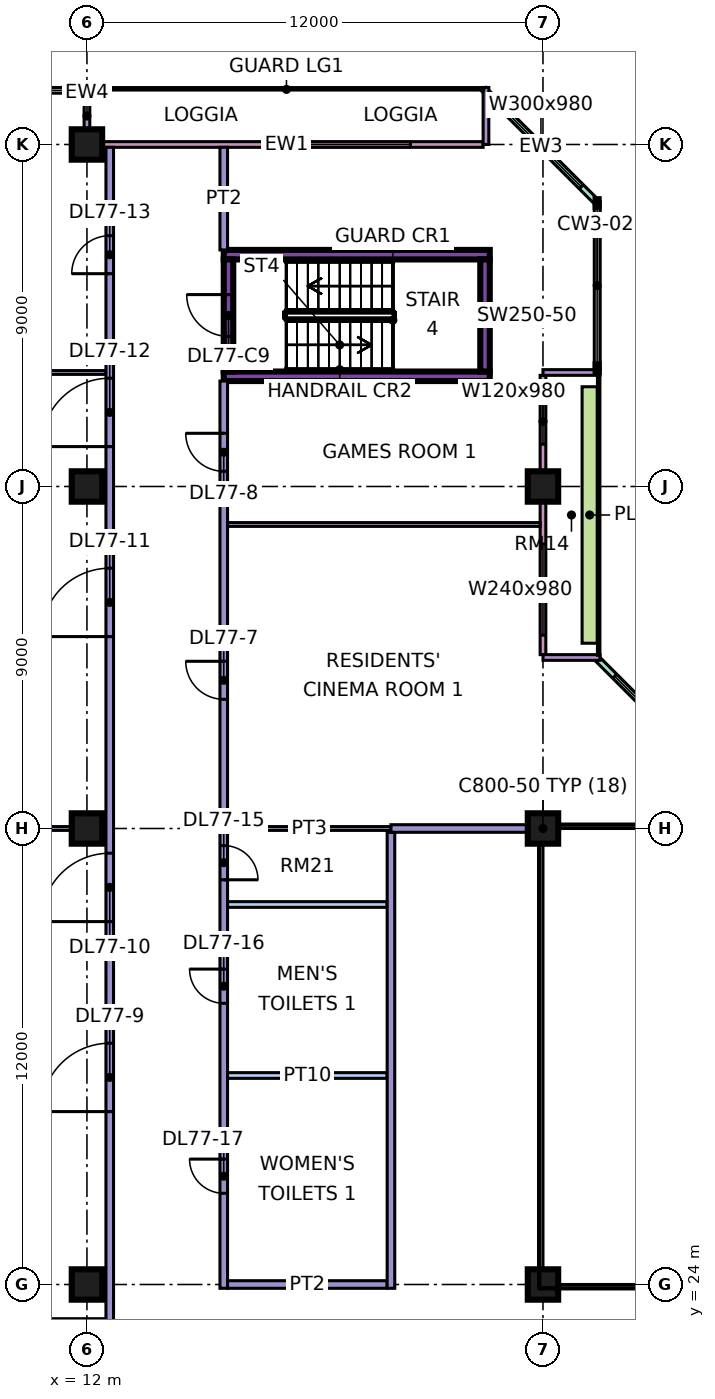
"""IFC4 building model, lengths in metres.
Left out: names, types, materials, properties, quantities, classifications, styles, units other than length and angle.
Written with IfcOpenShell. Run it as: python <this file> out.ifc"""

import sys

from ifc_helpers import new_model, si_unit, direction, frame, frame_2d, origin, origin_2d, place, context, subcontext, project, spatial, rectangle, extrude, element, fill, save


model = new_model("IFC4")
c1 = context("Model", 3, precision=1e-05, world=origin(), true_north=direction((0.0, 1.0)))
c2 = subcontext(c1, "Body", "Model", "MODEL_VIEW")
j1 = project(units=[si_unit("LENGTHUNIT", "METRE"), si_unit("PLANEANGLEUNIT", "RADIAN")], contexts=[c1])
p1 = place(None, origin())
s1 = spatial("IfcSite", under=j1, at=p1, CompositionType="ELEMENT")
p2 = place(p1, origin())
s2 = spatial("IfcBuilding", under=s1, at=p2, CompositionType="ELEMENT")
p3 = place(p2, frame((0.0, 0.0, 327.65)))
s3 = spatial("IfcBuildingStorey", under=s2, at=p3, CompositionType="ELEMENT", Elevation=327.65)
for number, where, z_axis, x_axis in (
    (1, (12.0, 24.0, 0.0), (0.0, 0.0, 1.0), (1.0, 0.0, 0.0)),
    (2, (12.0, 36.0, 0.0), (0.0, 0.0, 1.0), (1.0, 0.0, 0.0)),
    (3, (12.0, 45.0, 0.0), (0.0, 0.0, 1.0), (1.0, 0.0, 0.0)),
    (4, (12.0, 54.0, 0.0), (0.0, 0.0, 1.0), (1.0, 0.0, 0.0)),
    (5, (24.0, 24.0, 0.0), (0.0, 0.0, 1.0), (1.0, 0.0, 0.0)),
    (6, (24.0, 36.0, 0.0), (0.0, 0.0, 1.0), (1.0, 0.0, 0.0)),
    (7, (24.0, 45.0, 0.0), (0.0, 0.0, 1.0), (1.0, 0.0, 0.0)),
):
    element("IfcColumn", number, at=place(p3, frame(where, z_axis=z_axis, x_axis=x_axis)), inside=s3, PredefinedType="COLUMN", context=c2, shape_type="SweptSolid", body=[
        extrude(rectangle(XDim=0.8, YDim=0.8, at=origin_2d()), origin(), (0.0, 0.0, 1.0), 11.25),
    ])
for number, where, z_axis, x_axis in (
    (8, (15.6, 47.9, 0.0), (0.0, 0.0, 1.0), (1.0, 0.0, 0.0)),
    (9, (15.6, 51.1, 0.0), (0.0, 0.0, 1.0), (1.0, 0.0, 0.0)),
):
    element("IfcWall", number, at=place(p3, frame(where, z_axis=z_axis, x_axis=x_axis)), inside=s3, PredefinedType="SHEAR", context=c2, shape_type="SweptSolid", body=[
        extrude(rectangle(XDim=7.0, YDim=0.25, at=frame_2d((3.5, 0.0))), origin(), (0.0, 0.0, 1.0), 11.25),
    ])
p4 = place(p3, frame((15.725, 48.025, 0.0), z_axis=(0.0, 0.0, 1.0), x_axis=(0.0, 1.0, 0.0)))
e10 = element("IfcWall", 10, at=p4, inside=s3, PredefinedType="SHEAR", context=c2, shape_type="SweptSolid", body=[
    extrude(rectangle(XDim=2.95, YDim=0.25, at=frame_2d((1.475, 0.0))), origin(), (0.0, 0.0, 1.0), 11.25),
])
p5 = place(p4, frame((0.925, 0.0, 0.0)))
e11 = element("IfcOpeningElement", 11, at=p5, cuts=e10, PredefinedType="OPENING", context=c2, shape_type="SweptSolid", body=[
    extrude(rectangle(XDim=1.1, YDim=2.2, at=frame_2d((0.55, 1.1))), frame((0.0, 0.135, 0.0), z_axis=(0.0, -1.0, 0.0), x_axis=(1.0, 0.0, 0.0)), (0.0, 0.0, 1.0), 0.27),
])
p6 = place(p3, frame((22.475, 48.025, 0.0), z_axis=(0.0, 0.0, 1.0), x_axis=(0.0, 1.0, 0.0)))
e12 = element("IfcWall", 12, at=p6, inside=s3, PredefinedType="SHEAR", context=c2, shape_type="SweptSolid", body=[
    extrude(rectangle(XDim=2.95, YDim=0.25, at=frame_2d((1.475, 0.0))), origin(), (0.0, 0.0, 1.0), 11.25),
])
p7 = place(p3, frame((28.447, 37.447, 0.0), z_axis=(0.0, 0.0, 1.0), x_axis=(-0.707106781187, 0.707106781187, 0.0)))
e13 = element("IfcWall", 13, at=p7, inside=s3, PredefinedType="SOLIDWALL", context=c2, shape_type="SweptSolid", body=[
    extrude(rectangle(XDim=4.243, YDim=0.15, at=frame_2d((2.121, 0.0))), origin(), (0.0, 0.0, 1.0), 10.85),
])
p8 = place(p7, frame((0.621, 0.0, 0.45)))
e14 = element("IfcOpeningElement", 14, at=p8, cuts=e13, PredefinedType="OPENING", context=c2, shape_type="SweptSolid", body=[
    extrude(rectangle(XDim=3.0, YDim=9.8, at=frame_2d((1.5, 4.9))), frame((0.0, 0.085, 0.0), z_axis=(0.0, -1.0, 0.0), x_axis=(1.0, 0.0, 0.0)), (0.0, 0.0, 1.0), 0.17),
])
p9 = place(p3, frame((24.0, 40.575, 0.0), z_axis=(0.0, 0.0, 1.0), x_axis=(0.0, 1.0, 0.0)))
e15 = element("IfcWall", 15, at=p9, inside=s3, PredefinedType="SOLIDWALL", context=c2, shape_type="SweptSolid", body=[
    extrude(rectangle(XDim=7.35, YDim=0.15, at=frame_2d((3.675, 0.0))), origin(), (0.0, 0.0, 1.0), 10.85),
])
p10 = place(p9, frame((0.512, 0.0, 0.45)))
e16 = element("IfcOpeningElement", 16, at=p10, cuts=e15, PredefinedType="OPENING", context=c2, shape_type="SweptSolid", body=[
    extrude(rectangle(XDim=2.4, YDim=9.8, at=frame_2d((1.2, 4.9))), frame((0.0, 0.085, 0.0), z_axis=(0.0, -1.0, 0.0), x_axis=(1.0, 0.0, 0.0)), (0.0, 0.0, 1.0), 0.17),
])
p11 = place(p9, frame((5.538, 0.0, 0.45)))
e17 = element("IfcOpeningElement", 17, at=p11, cuts=e15, PredefinedType="OPENING", context=c2, shape_type="SweptSolid", body=[
    extrude(rectangle(XDim=1.2, YDim=9.8, at=frame_2d((0.6, 4.9))), frame((0.0, 0.085, 0.0), z_axis=(0.0, -1.0, 0.0), x_axis=(1.0, 0.0, 0.0)), (0.0, 0.0, 1.0), 0.17),
])
for number, where, z_axis, x_axis in (
    (18, (25.5, 40.5, 0.0), (0.0, 0.0, 1.0), (-1.0, 0.0, 0.0)),
    (19, (25.5, 48.0, 0.0), (0.0, 0.0, 1.0), (-1.0, 0.0, 0.0)),
):
    element("IfcWall", number, at=place(p3, frame(where, z_axis=z_axis, x_axis=x_axis)), inside=s3, PredefinedType="SOLIDWALL", context=c2, shape_type="SweptSolid", body=[
        extrude(rectangle(XDim=1.5, YDim=0.15, at=frame_2d((0.75, 0.0))), origin(), (0.0, 0.0, 1.0), 10.85),
    ])
p12 = place(p3, frame((25.447, 52.447, 0.0), z_axis=(0.0, 0.0, 1.0), x_axis=(-0.707106781187, 0.707106781187, 0.0)))
e20 = element("IfcWall", 20, at=p12, inside=s3, PredefinedType="SOLIDWALL", context=c2, shape_type="SweptSolid", body=[
    extrude(rectangle(XDim=4.243, YDim=0.15, at=frame_2d((2.121, 0.0))), origin(), (0.0, 0.0, 1.0), 10.85),
])
p13 = place(p12, frame((0.621, 0.0, 0.45)))
e21 = element("IfcOpeningElement", 21, at=p13, cuts=e20, PredefinedType="OPENING", context=c2, shape_type="SweptSolid", body=[
    extrude(rectangle(XDim=3.0, YDim=9.8, at=frame_2d((1.5, 4.9))), frame((0.0, 0.085, 0.0), z_axis=(0.0, -1.0, 0.0), x_axis=(1.0, 0.0, 0.0)), (0.0, 0.0, 1.0), 0.17),
])
p14 = place(p3, frame((22.425, 54.0, 0.0), z_axis=(0.0, 0.0, 1.0), x_axis=(-1.0, 0.0, 0.0)))
e22 = element("IfcWall", 22, at=p14, inside=s3, PredefinedType="SOLIDWALL", context=c2, shape_type="SweptSolid", body=[
    extrude(rectangle(XDim=10.35, YDim=0.15, at=frame_2d((5.175, 0.0))), origin(), (0.0, 0.0, 1.0), 10.85),
])
p15 = place(p14, frame((1.913, 0.0, 0.45)))
e23 = element("IfcOpeningElement", 23, at=p15, cuts=e22, PredefinedType="OPENING", context=c2, shape_type="SweptSolid", body=[
    extrude(rectangle(XDim=3.0, YDim=9.8, at=frame_2d((1.5, 4.9))), frame((0.0, 0.085, 0.0), z_axis=(0.0, -1.0, 0.0), x_axis=(1.0, 0.0, 0.0)), (0.0, 0.0, 1.0), 0.17),
])
for number, where, z_axis, x_axis in (
    (24, (22.5, 55.5, 0.0), (0.0, 0.0, 1.0), (0.0, -1.0, 0.0)),
    (25, (12.0, 55.5, 0.0), (0.0, 0.0, 1.0), (0.0, -1.0, 0.0)),
):
    element("IfcWall", number, at=place(p3, frame(where, z_axis=z_axis, x_axis=x_axis)), inside=s3, PredefinedType="SOLIDWALL", context=c2, shape_type="SweptSolid", body=[
        extrude(rectangle(XDim=1.5, YDim=0.15, at=frame_2d((0.75, 0.0))), origin(), (0.0, 0.0, 1.0), 10.85),
    ])
p16 = place(p3, frame((25.229, 40.875, 0.0), z_axis=(0.0, 0.0, 1.0), x_axis=(0.0, 1.0, 0.0)))
e26 = element("IfcWall", 26, at=p16, inside=s3, PredefinedType="SOLIDWALL", context=c2, shape_type="SweptSolid", body=[
    extrude(rectangle(XDim=6.75, YDim=0.4, at=frame_2d((3.375, 0.0))), origin(), (0.0, 0.0, 1.0), 0.7),
])
p17 = place(p3, frame((0.0, 36.0, 0.0), z_axis=(0.0, 0.0, 1.0), x_axis=(1.0, 0.0, 0.0)))
e27 = element("IfcWall", 27, at=p17, inside=s3, PredefinedType="PARTITIONING", context=c2, shape_type="SweptSolid", body=[
    extrude(rectangle(XDim=12.5, YDim=0.1, at=frame_2d((6.25, 0.0))), origin(), (0.0, 0.0, 1.0), 10.85),
])
p18 = place(p3, frame((0.0, 48.0, 0.0), z_axis=(0.0, 0.0, 1.0), x_axis=(1.0, 0.0, 0.0)))
e28 = element("IfcWall", 28, at=p18, inside=s3, PredefinedType="PARTITIONING", context=c2, shape_type="SweptSolid", body=[
    extrude(rectangle(XDim=12.5, YDim=0.1, at=frame_2d((6.25, 0.0))), origin(), (0.0, 0.0, 1.0), 10.85),
])
p19 = place(p3, frame((0.074, 23.0, 0.0), z_axis=(0.0, 0.0, 1.0), x_axis=(1.0, 0.0, 0.0)))
e29 = element("IfcWall", 29, at=p19, inside=s3, PredefinedType="PARTITIONING", context=c2, shape_type="SweptSolid", body=[
    extrude(rectangle(XDim=12.426, YDim=0.2, at=frame_2d((6.213, 0.0))), origin(), (0.0, 0.0, 1.0), 10.85),
])
p20 = place(p3, frame((12.6, 22.9, 0.0), z_axis=(0.0, 0.0, 1.0), x_axis=(0.0, 1.0, 0.0)))
e30 = element("IfcWall", 30, at=p20, inside=s3, PredefinedType="PARTITIONING", context=c2, shape_type="SweptSolid", body=[
    extrude(rectangle(XDim=31.026, YDim=0.2, at=frame_2d((15.513, 0.0))), origin(), (0.0, 0.0, 1.0), 10.85),
])
p21 = place(p20, frame((5.65, 0.0, 0.0)))
e31 = element("IfcOpeningElement", 31, at=p21, cuts=e30, PredefinedType="OPENING", context=c2, shape_type="SweptSolid", body=[
    extrude(rectangle(XDim=1.8, YDim=2.1, at=frame_2d((0.9, 1.05))), frame((0.0, 0.11, 0.0), z_axis=(0.0, -1.0, 0.0), x_axis=(1.0, 0.0, 0.0)), (0.0, 0.0, 1.0), 0.22),
])
p22 = place(p20, frame((10.65, 0.0, 0.0)))
e32 = element("IfcOpeningElement", 32, at=p22, cuts=e30, PredefinedType="OPENING", context=c2, shape_type="SweptSolid", body=[
    extrude(rectangle(XDim=1.8, YDim=2.1, at=frame_2d((0.9, 1.05))), frame((0.0, 0.11, 0.0), z_axis=(0.0, -1.0, 0.0), x_axis=(1.0, 0.0, 0.0)), (0.0, 0.0, 1.0), 0.22),
])
p23 = place(p20, frame((18.15, 0.0, 0.0)))
e33 = element("IfcOpeningElement", 33, at=p23, cuts=e30, PredefinedType="OPENING", context=c2, shape_type="SweptSolid", body=[
    extrude(rectangle(XDim=1.8, YDim=2.1, at=frame_2d((0.9, 1.05))), frame((0.0, 0.11, 0.0), z_axis=(0.0, -1.0, 0.0), x_axis=(1.0, 0.0, 0.0)), (0.0, 0.0, 1.0), 0.22),
])
p24 = place(p20, frame((23.15, 0.0, 0.0)))
e34 = element("IfcOpeningElement", 34, at=p24, cuts=e30, PredefinedType="OPENING", context=c2, shape_type="SweptSolid", body=[
    extrude(rectangle(XDim=1.8, YDim=2.1, at=frame_2d((0.9, 1.05))), frame((0.0, 0.11, 0.0), z_axis=(0.0, -1.0, 0.0), x_axis=(1.0, 0.0, 0.0)), (0.0, 0.0, 1.0), 0.22),
])
p25 = place(p20, frame((27.7, 0.0, 0.0)))
e35 = element("IfcOpeningElement", 35, at=p25, cuts=e30, PredefinedType="OPENING", context=c2, shape_type="SweptSolid", body=[
    extrude(rectangle(XDim=1.0, YDim=2.1, at=frame_2d((0.5, 1.05))), frame((0.0, 0.11, 0.0), z_axis=(0.0, -1.0, 0.0), x_axis=(1.0, 0.0, 0.0)), (0.0, 0.0, 1.0), 0.22),
])
p26 = place(p3, frame((15.6, 23.9, 0.0), z_axis=(0.0, 0.0, 1.0), x_axis=(0.0, 1.0, 0.0)))
e36 = element("IfcWall", 36, at=p26, inside=s3, PredefinedType="PARTITIONING", context=c2, shape_type="SweptSolid", body=[
    extrude(rectangle(XDim=23.875, YDim=0.2, at=frame_2d((11.938, 0.0))), origin(), (0.0, 0.0, 1.0), 10.85),
])
p27 = place(p26, frame((15.5, 0.0, 0.0)))
e37 = element("IfcOpeningElement", 37, at=p27, cuts=e36, PredefinedType="OPENING", context=c2, shape_type="SweptSolid", body=[
    extrude(rectangle(XDim=1.0, YDim=2.1, at=frame_2d((0.5, 1.05))), frame((0.0, 0.11, 0.0), z_axis=(0.0, -1.0, 0.0), x_axis=(1.0, 0.0, 0.0)), (0.0, 0.0, 1.0), 0.22),
])
p28 = place(p26, frame((21.5, 0.0, 0.0)))
e38 = element("IfcOpeningElement", 38, at=p28, cuts=e36, PredefinedType="OPENING", context=c2, shape_type="SweptSolid", body=[
    extrude(rectangle(XDim=1.0, YDim=2.1, at=frame_2d((0.5, 1.05))), frame((0.0, 0.11, 0.0), z_axis=(0.0, -1.0, 0.0), x_axis=(1.0, 0.0, 0.0)), (0.0, 0.0, 1.0), 0.22),
])
p29 = place(p26, frame((10.75, 0.0, 0.0)))
e39 = element("IfcOpeningElement", 39, at=p29, cuts=e36, PredefinedType="OPENING", context=c2, shape_type="SweptSolid", body=[
    extrude(rectangle(XDim=0.9, YDim=2.1, at=frame_2d((0.45, 1.05))), frame((0.0, 0.11, 0.0), z_axis=(0.0, -1.0, 0.0), x_axis=(1.0, 0.0, 0.0)), (0.0, 0.0, 1.0), 0.22),
])
p30 = place(p26, frame((7.5, 0.0, 0.0)))
e40 = element("IfcOpeningElement", 40, at=p30, cuts=e36, PredefinedType="OPENING", context=c2, shape_type="SweptSolid", body=[
    extrude(rectangle(XDim=0.9, YDim=2.1, at=frame_2d((0.45, 1.05))), frame((0.0, 0.11, 0.0), z_axis=(0.0, -1.0, 0.0), x_axis=(1.0, 0.0, 0.0)), (0.0, 0.0, 1.0), 0.22),
])
p31 = place(p26, frame((2.5, 0.0, 0.0)))
e41 = element("IfcOpeningElement", 41, at=p31, cuts=e36, PredefinedType="OPENING", context=c2, shape_type="SweptSolid", body=[
    extrude(rectangle(XDim=0.9, YDim=2.1, at=frame_2d((0.45, 1.05))), frame((0.0, 0.11, 0.0), z_axis=(0.0, -1.0, 0.0), x_axis=(1.0, 0.0, 0.0)), (0.0, 0.0, 1.0), 0.22),
])
p32 = place(p3, frame((15.6, 51.225, 0.0), z_axis=(0.0, 0.0, 1.0), x_axis=(0.0, 1.0, 0.0)))
e42 = element("IfcWall", 42, at=p32, inside=s3, PredefinedType="PARTITIONING", context=c2, shape_type="SweptSolid", body=[
    extrude(rectangle(XDim=2.701, YDim=0.2, at=frame_2d((1.351, 0.0))), origin(), (0.0, 0.0, 1.0), 10.85),
])
p33 = place(p3, frame((15.7, 24.0, 0.0), z_axis=(0.0, 0.0, 1.0), x_axis=(1.0, 0.0, 0.0)))
e43 = element("IfcWall", 43, at=p33, inside=s3, PredefinedType="PARTITIONING", context=c2, shape_type="SweptSolid", body=[
    extrude(rectangle(XDim=4.2, YDim=0.2, at=frame_2d((2.1, 0.0))), origin(), (0.0, 0.0, 1.0), 10.85),
])
for number, where, z_axis, x_axis in (
    (44, (15.7, 29.5, 0.0), (0.0, 0.0, 1.0), (1.0, 0.0, 0.0)),
    (45, (15.7, 34.0, 0.0), (0.0, 0.0, 1.0), (1.0, 0.0, 0.0)),
):
    element("IfcWall", number, at=place(p3, frame(where, z_axis=z_axis, x_axis=x_axis)), inside=s3, PredefinedType="PARTITIONING", context=c2, shape_type="SweptSolid", body=[
        extrude(rectangle(XDim=4.2, YDim=0.15, at=frame_2d((2.1, 0.0))), origin(), (0.0, 0.0, 1.0), 10.85),
    ])
p34 = place(p3, frame((15.7, 36.0, 0.0), z_axis=(0.0, 0.0, 1.0), x_axis=(1.0, 0.0, 0.0)))
e46 = element("IfcWall", 46, at=p34, inside=s3, PredefinedType="PARTITIONING", context=c2, shape_type="SweptSolid", body=[
    extrude(rectangle(XDim=4.3, YDim=0.1, at=frame_2d((2.15, 0.0))), origin(), (0.0, 0.0, 1.0), 10.85),
])
p35 = place(p3, frame((15.7, 44.0, 0.0), z_axis=(0.0, 0.0, 1.0), x_axis=(1.0, 0.0, 0.0)))
e47 = element("IfcWall", 47, at=p35, inside=s3, PredefinedType="PARTITIONING", context=c2, shape_type="SweptSolid", body=[
    extrude(rectangle(XDim=8.226, YDim=0.1, at=frame_2d((4.113, 0.0))), origin(), (0.0, 0.0, 1.0), 10.85),
])
p36 = place(p3, frame((20.0, 23.9, 0.0), z_axis=(0.0, 0.0, 1.0), x_axis=(0.0, 1.0, 0.0)))
e48 = element("IfcWall", 48, at=p36, inside=s3, PredefinedType="PARTITIONING", context=c2, shape_type="SweptSolid", body=[
    extrude(rectangle(XDim=12.0, YDim=0.2, at=frame_2d((6.0, 0.0))), origin(), (0.0, 0.0, 1.0), 10.85),
])
p37 = place(p3, frame((20.0, 36.0, 0.0), z_axis=(0.0, 0.0, 1.0), x_axis=(1.0, 0.0, 0.0)))
e49 = element("IfcWall", 49, at=p37, inside=s3, PredefinedType="PARTITIONING", context=c2, shape_type="SweptSolid", body=[
    extrude(rectangle(XDim=4.0, YDim=0.2, at=frame_2d((2.0, 0.0))), origin(), (0.0, 0.0, 1.0), 10.85),
])
p38 = place(p8, origin())
e50 = element("IfcWindow", 50, at=p38, inside=s3, PartitioningType="SINGLE_PANEL", PredefinedType="WINDOW", context=c2, shape_type="SweptSolid", body=[
    extrude(rectangle(XDim=3.0, YDim=9.8, at=frame_2d((1.5, 4.9))), frame((0.0, 0.03, 0.0), z_axis=(0.0, -1.0, 0.0), x_axis=(1.0, 0.0, 0.0)), (0.0, 0.0, 1.0), 0.06),
])
fill(e14, e50)
p39 = place(p10, origin())
e51 = element("IfcWindow", 51, at=p39, inside=s3, PartitioningType="SINGLE_PANEL", PredefinedType="WINDOW", context=c2, shape_type="SweptSolid", body=[
    extrude(rectangle(XDim=2.4, YDim=9.8, at=frame_2d((1.2, 4.9))), frame((0.0, 0.03, 0.0), z_axis=(0.0, -1.0, 0.0), x_axis=(1.0, 0.0, 0.0)), (0.0, 0.0, 1.0), 0.06),
])
fill(e16, e51)
p40 = place(p11, origin())
e52 = element("IfcWindow", 52, at=p40, inside=s3, PartitioningType="SINGLE_PANEL", PredefinedType="WINDOW", context=c2, shape_type="SweptSolid", body=[
    extrude(rectangle(XDim=1.2, YDim=9.8, at=frame_2d((0.6, 4.9))), frame((0.0, 0.03, 0.0), z_axis=(0.0, -1.0, 0.0), x_axis=(1.0, 0.0, 0.0)), (0.0, 0.0, 1.0), 0.06),
])
fill(e17, e52)
p41 = place(p13, origin())
e53 = element("IfcWindow", 53, at=p41, inside=s3, PartitioningType="SINGLE_PANEL", PredefinedType="WINDOW", context=c2, shape_type="SweptSolid", body=[
    extrude(rectangle(XDim=3.0, YDim=9.8, at=frame_2d((1.5, 4.9))), frame((0.0, 0.03, 0.0), z_axis=(0.0, -1.0, 0.0), x_axis=(1.0, 0.0, 0.0)), (0.0, 0.0, 1.0), 0.06),
])
fill(e21, e53)
p42 = place(p15, origin())
e54 = element("IfcWindow", 54, at=p42, inside=s3, PartitioningType="SINGLE_PANEL", PredefinedType="WINDOW", context=c2, shape_type="SweptSolid", body=[
    extrude(rectangle(XDim=3.0, YDim=9.8, at=frame_2d((1.5, 4.9))), frame((0.0, 0.03, 0.0), z_axis=(0.0, -1.0, 0.0), x_axis=(1.0, 0.0, 0.0)), (0.0, 0.0, 1.0), 0.06),
])
fill(e23, e54)
p43 = place(p5, frame((1.1, 0.0, 0.0), z_axis=(0.0, 0.0, 1.0), x_axis=(-1.0, 0.0, 0.0)))
e55 = element("IfcDoor", 55, at=p43, inside=s3, OperationType="SINGLE_SWING_RIGHT", PredefinedType="DOOR", context=c2, shape_type="SweptSolid", body=[
    extrude(rectangle(XDim=1.1, YDim=2.2, at=frame_2d((0.55, 1.1))), frame((0.0, 0.025, 0.0), z_axis=(0.0, -1.0, 0.0), x_axis=(1.0, 0.0, 0.0)), (0.0, 0.0, 1.0), 0.05),
])
fill(e11, e55)
p44 = place(p27, frame((1.0, 0.0, 0.0), z_axis=(0.0, 0.0, 1.0), x_axis=(-1.0, 0.0, 0.0)))
e56 = element("IfcDoor", 56, at=p44, inside=s3, OperationType="SINGLE_SWING_RIGHT", PredefinedType="DOOR", context=c2, shape_type="SweptSolid", body=[
    extrude(rectangle(XDim=1.0, YDim=2.1, at=frame_2d((0.5, 1.05))), frame((0.0, 0.025, 0.0), z_axis=(0.0, -1.0, 0.0), x_axis=(1.0, 0.0, 0.0)), (0.0, 0.0, 1.0), 0.05),
])
fill(e37, e56)
p45 = place(p28, frame((1.0, 0.0, 0.0), z_axis=(0.0, 0.0, 1.0), x_axis=(-1.0, 0.0, 0.0)))
e57 = element("IfcDoor", 57, at=p45, inside=s3, OperationType="SINGLE_SWING_RIGHT", PredefinedType="DOOR", context=c2, shape_type="SweptSolid", body=[
    extrude(rectangle(XDim=1.0, YDim=2.1, at=frame_2d((0.5, 1.05))), frame((0.0, 0.025, 0.0), z_axis=(0.0, -1.0, 0.0), x_axis=(1.0, 0.0, 0.0)), (0.0, 0.0, 1.0), 0.05),
])
fill(e38, e57)
p46 = place(p21, origin())
e58 = element("IfcDoor", 58, at=p46, inside=s3, OperationType="DOUBLE_DOOR_SINGLE_SWING", PredefinedType="DOOR", context=c2, shape_type="SweptSolid", body=[
    extrude(rectangle(XDim=1.8, YDim=2.1, at=frame_2d((0.9, 1.05))), frame((0.0, 0.025, 0.0), z_axis=(0.0, -1.0, 0.0), x_axis=(1.0, 0.0, 0.0)), (0.0, 0.0, 1.0), 0.05),
])
fill(e31, e58)
p47 = place(p22, origin())
e59 = element("IfcDoor", 59, at=p47, inside=s3, OperationType="DOUBLE_DOOR_SINGLE_SWING", PredefinedType="DOOR", context=c2, shape_type="SweptSolid", body=[
    extrude(rectangle(XDim=1.8, YDim=2.1, at=frame_2d((0.9, 1.05))), frame((0.0, 0.025, 0.0), z_axis=(0.0, -1.0, 0.0), x_axis=(1.0, 0.0, 0.0)), (0.0, 0.0, 1.0), 0.05),
])
fill(e32, e59)
p48 = place(p23, origin())
e60 = element("IfcDoor", 60, at=p48, inside=s3, OperationType="DOUBLE_DOOR_SINGLE_SWING", PredefinedType="DOOR", context=c2, shape_type="SweptSolid", body=[
    extrude(rectangle(XDim=1.8, YDim=2.1, at=frame_2d((0.9, 1.05))), frame((0.0, 0.025, 0.0), z_axis=(0.0, -1.0, 0.0), x_axis=(1.0, 0.0, 0.0)), (0.0, 0.0, 1.0), 0.05),
])
fill(e33, e60)
p49 = place(p24, origin())
e61 = element("IfcDoor", 61, at=p49, inside=s3, OperationType="DOUBLE_DOOR_SINGLE_SWING", PredefinedType="DOOR", context=c2, shape_type="SweptSolid", body=[
    extrude(rectangle(XDim=1.8, YDim=2.1, at=frame_2d((0.9, 1.05))), frame((0.0, 0.025, 0.0), z_axis=(0.0, -1.0, 0.0), x_axis=(1.0, 0.0, 0.0)), (0.0, 0.0, 1.0), 0.05),
])
fill(e34, e61)
p50 = place(p25, origin())
e62 = element("IfcDoor", 62, at=p50, inside=s3, OperationType="SINGLE_SWING_LEFT", PredefinedType="DOOR", context=c2, shape_type="SweptSolid", body=[
    extrude(rectangle(XDim=1.0, YDim=2.1, at=frame_2d((0.5, 1.05))), frame((0.0, 0.025, 0.0), z_axis=(0.0, -1.0, 0.0), x_axis=(1.0, 0.0, 0.0)), (0.0, 0.0, 1.0), 0.05),
])
fill(e35, e62)
p51 = place(p29, frame((0.9, 0.0, 0.0), z_axis=(0.0, 0.0, 1.0), x_axis=(-1.0, 0.0, 0.0)))
e63 = element("IfcDoor", 63, at=p51, inside=s3, OperationType="SINGLE_SWING_LEFT", PredefinedType="DOOR", context=c2, shape_type="SweptSolid", body=[
    extrude(rectangle(XDim=0.9, YDim=2.1, at=frame_2d((0.45, 1.05))), frame((0.0, 0.025, 0.0), z_axis=(0.0, -1.0, 0.0), x_axis=(1.0, 0.0, 0.0)), (0.0, 0.0, 1.0), 0.05),
])
fill(e39, e63)
p52 = place(p30, frame((0.9, 0.0, 0.0), z_axis=(0.0, 0.0, 1.0), x_axis=(-1.0, 0.0, 0.0)))
e64 = element("IfcDoor", 64, at=p52, inside=s3, OperationType="SINGLE_SWING_RIGHT", PredefinedType="DOOR", context=c2, shape_type="SweptSolid", body=[
    extrude(rectangle(XDim=0.9, YDim=2.1, at=frame_2d((0.45, 1.05))), frame((0.0, 0.025, 0.0), z_axis=(0.0, -1.0, 0.0), x_axis=(1.0, 0.0, 0.0)), (0.0, 0.0, 1.0), 0.05),
])
fill(e40, e64)
p53 = place(p31, frame((0.9, 0.0, 0.0), z_axis=(0.0, 0.0, 1.0), x_axis=(-1.0, 0.0, 0.0)))
e65 = element("IfcDoor", 65, at=p53, inside=s3, OperationType="SINGLE_SWING_RIGHT", PredefinedType="DOOR", context=c2, shape_type="SweptSolid", body=[
    extrude(rectangle(XDim=0.9, YDim=2.1, at=frame_2d((0.45, 1.05))), frame((0.0, 0.025, 0.0), z_axis=(0.0, -1.0, 0.0), x_axis=(1.0, 0.0, 0.0)), (0.0, 0.0, 1.0), 0.05),
])
fill(e41, e65)
save(model, sys.argv[1])
